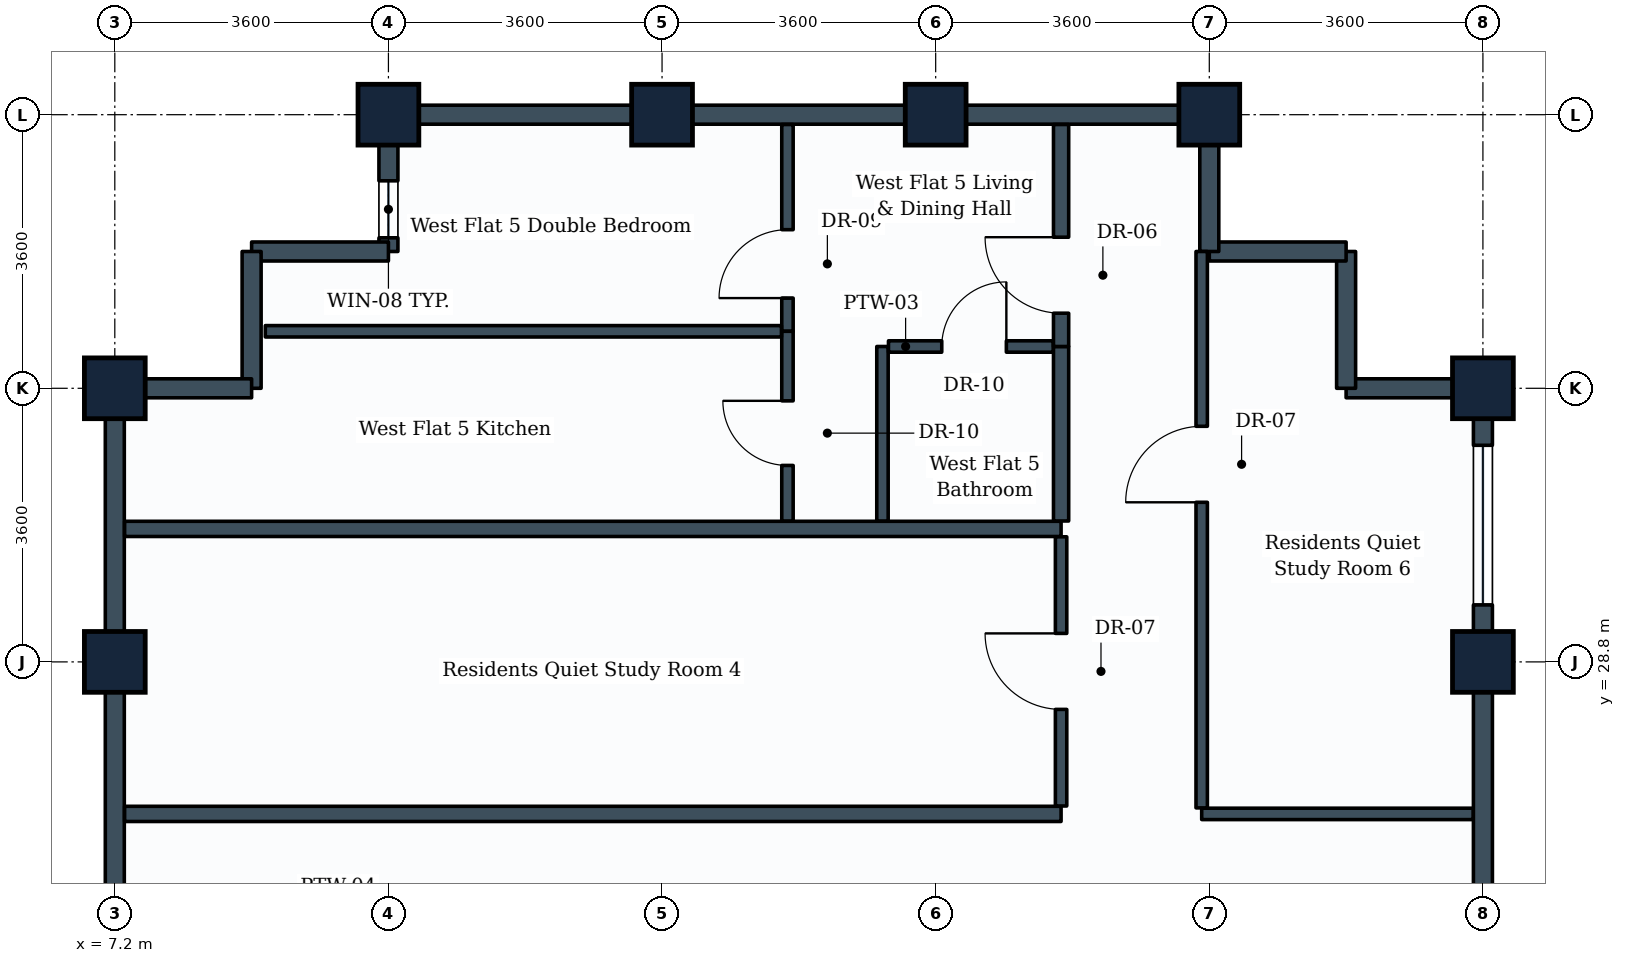
"""IFC4 building model, lengths in metres.
Left out: names, types, materials, properties, quantities, classifications, styles, units other than length and angle.
Written with IfcOpenShell. Run it as: python <this file> out.ifc"""

import sys

from ifc_helpers import new_model, si_unit, direction, frame, frame_2d, origin, origin_2d, place, context, subcontext, project, spatial, rectangle, extrude, element, fill, save


model = new_model("IFC4")
c1 = context("Model", 3, precision=1e-05, world=origin(), true_north=direction((0.0, 1.0)))
c2 = subcontext(c1, "Body", "Model", "MODEL_VIEW")
j1 = project(units=[si_unit("LENGTHUNIT", "METRE"), si_unit("PLANEANGLEUNIT", "RADIAN")], contexts=[c1])
p1 = place(None, origin())
s1 = spatial("IfcSite", under=j1, at=p1, CompositionType="ELEMENT")
p2 = place(p1, origin())
s2 = spatial("IfcBuilding", under=s1, at=p2, CompositionType="ELEMENT")
p3 = place(p2, frame((0.0, 0.0, 277.4)))
s3 = spatial("IfcBuildingStorey", under=s2, at=p3, CompositionType="ELEMENT", Elevation=277.4)
for number, where, z_axis, x_axis in (
    (1, (7.2, 28.8, 0.0), (0.0, 0.0, 1.0), (0.0, 1.0, 0.0)),
    (2, (7.2, 32.4, 0.0), (0.0, 0.0, 1.0), (0.0, 1.0, 0.0)),
    (3, (10.8, 36.0, 0.0), (0.0, 0.0, 1.0), (1.0, 0.0, 0.0)),
    (4, (14.4, 36.0, 0.0), (0.0, 0.0, 1.0), (1.0, 0.0, 0.0)),
    (5, (18.0, 36.0, 0.0), (0.0, 0.0, 1.0), (1.0, 0.0, 0.0)),
    (6, (21.6, 36.0, 0.0), (0.0, 0.0, 1.0), (1.0, 0.0, 0.0)),
    (7, (25.2, 28.8, 0.0), (0.0, 0.0, 1.0), (0.0, 1.0, 0.0)),
    (8, (25.2, 32.4, 0.0), (0.0, 0.0, 1.0), (0.0, 1.0, 0.0)),
):
    element("IfcColumn", number, at=place(p3, frame(where, z_axis=z_axis, x_axis=x_axis)), inside=s3, PredefinedType="COLUMN", context=c2, shape_type="SweptSolid", body=[
        extrude(rectangle(XDim=0.8, YDim=0.8, at=origin_2d()), origin(), (0.0, 0.0, 1.0), 3.6),
    ])
p4 = place(p3, frame((25.2, 28.8, 0.0), z_axis=(0.0, 0.0, 1.0), x_axis=(0.0, -1.0, 0.0)))
e9 = element("IfcWall", 9, at=p4, inside=s3, PredefinedType="STANDARD", context=c2, shape_type="SweptSolid", body=[
    extrude(rectangle(XDim=3.6, YDim=0.25, at=frame_2d((1.8, 0.0))), origin(), (0.0, 0.0, 1.0), 2.83),
])
p5 = place(p3, frame((25.2, 32.4, 0.0), z_axis=(0.0, 0.0, 1.0), x_axis=(0.0, -1.0, 0.0)))
e10 = element("IfcWall", 10, at=p5, inside=s3, PredefinedType="STANDARD", context=c2, shape_type="SweptSolid", body=[
    extrude(rectangle(XDim=3.6, YDim=0.25, at=frame_2d((1.8, 0.0))), origin(), (0.0, 0.0, 1.0), 2.83),
])
p6 = place(p5, frame((0.75, 0.0, 0.85)))
e11 = element("IfcOpeningElement", 11, at=p6, cuts=e10, PredefinedType="OPENING", context=c2, shape_type="SweptSolid", body=[
    extrude(rectangle(XDim=2.1, YDim=1.35, at=frame_2d((1.05, 0.675))), frame((0.0, 0.135, 0.0), z_axis=(0.0, -1.0, 0.0), x_axis=(1.0, 0.0, 0.0)), (0.0, 0.0, 1.0), 0.27),
])
p7 = place(p3, frame((23.4, 32.4, 0.0), z_axis=(0.0, 0.0, 1.0), x_axis=(1.0, 0.0, 0.0)))
e12 = element("IfcWall", 12, at=p7, inside=s3, PredefinedType="STANDARD", context=c2, shape_type="SweptSolid", body=[
    extrude(rectangle(XDim=1.8, YDim=0.25, at=frame_2d((0.9, 0.0))), origin(), (0.0, 0.0, 1.0), 2.83),
])
p8 = place(p3, frame((23.4, 32.4, 0.0), z_axis=(0.0, 0.0, 1.0), x_axis=(0.0, 1.0, 0.0)))
e13 = element("IfcWall", 13, at=p8, inside=s3, PredefinedType="STANDARD", context=c2, shape_type="SweptSolid", body=[
    extrude(rectangle(XDim=1.8, YDim=0.25, at=frame_2d((0.9, 0.0))), origin(), (0.0, 0.0, 1.0), 3.335),
])
p9 = place(p3, frame((21.6, 34.2, 0.0), z_axis=(0.0, 0.0, 1.0), x_axis=(1.0, 0.0, 0.0)))
e14 = element("IfcWall", 14, at=p9, inside=s3, PredefinedType="STANDARD", context=c2, shape_type="SweptSolid", body=[
    extrude(rectangle(XDim=1.8, YDim=0.25, at=frame_2d((0.9, 0.0))), origin(), (0.0, 0.0, 1.0), 3.335),
])
p10 = place(p3, frame((21.6, 34.2, 0.0), z_axis=(0.0, 0.0, 1.0), x_axis=(0.0, 1.0, 0.0)))
e15 = element("IfcWall", 15, at=p10, inside=s3, PredefinedType="STANDARD", context=c2, shape_type="SweptSolid", body=[
    extrude(rectangle(XDim=1.8, YDim=0.25, at=frame_2d((0.9, 0.0))), origin(), (0.0, 0.0, 1.0), 2.83),
])
for number, where, z_axis, x_axis in (
    (16, (18.0, 36.0, 0.0), (0.0, 0.0, 1.0), (1.0, 0.0, 0.0)),
    (17, (14.4, 36.0, 0.0), (0.0, 0.0, 1.0), (1.0, 0.0, 0.0)),
):
    element("IfcWall", number, at=place(p3, frame(where, z_axis=z_axis, x_axis=x_axis)), inside=s3, PredefinedType="STANDARD", context=c2, shape_type="SweptSolid", body=[
        extrude(rectangle(XDim=3.6, YDim=0.25, at=frame_2d((1.8, 0.0))), origin(), (0.0, 0.0, 1.0), 2.83),
    ])
p11 = place(p3, frame((10.8, 36.0, 0.0), z_axis=(0.0, 0.0, 1.0), x_axis=(1.0, 0.0, 0.0)))
e18 = element("IfcWall", 18, at=p11, inside=s3, PredefinedType="STANDARD", context=c2, shape_type="SweptSolid", body=[
    extrude(rectangle(XDim=3.6, YDim=0.25, at=frame_2d((1.8, 0.0))), origin(), (0.0, 0.0, 1.0), 2.83),
])
p12 = place(p3, frame((10.8, 34.2, 0.0), z_axis=(0.0, 0.0, 1.0), x_axis=(0.0, 1.0, 0.0)))
e19 = element("IfcWall", 19, at=p12, inside=s3, PredefinedType="STANDARD", context=c2, shape_type="SweptSolid", body=[
    extrude(rectangle(XDim=1.8, YDim=0.25, at=frame_2d((0.9, 0.0))), origin(), (0.0, 0.0, 1.0), 2.83),
])
p13 = place(p12, frame((0.18, 0.0, 0.85)))
e20 = element("IfcOpeningElement", 20, at=p13, cuts=e19, PredefinedType="OPENING", context=c2, shape_type="SweptSolid", body=[
    extrude(rectangle(XDim=0.75, YDim=1.05, at=frame_2d((0.375, 0.525))), frame((0.0, 0.135, 0.0), z_axis=(0.0, -1.0, 0.0), x_axis=(1.0, 0.0, 0.0)), (0.0, 0.0, 1.0), 0.27),
])
for number, where, z_axis, x_axis in (
    (21, (9.0, 34.2, 0.0), (0.0, 0.0, 1.0), (1.0, 0.0, 0.0)),
    (22, (9.0, 32.4, 0.0), (0.0, 0.0, 1.0), (0.0, 1.0, 0.0)),
):
    element("IfcWall", number, at=place(p3, frame(where, z_axis=z_axis, x_axis=x_axis)), inside=s3, PredefinedType="STANDARD", context=c2, shape_type="SweptSolid", body=[
        extrude(rectangle(XDim=1.8, YDim=0.25, at=frame_2d((0.9, 0.0))), origin(), (0.0, 0.0, 1.0), 3.335),
    ])
p14 = place(p3, frame((7.2, 32.4, 0.0), z_axis=(0.0, 0.0, 1.0), x_axis=(1.0, 0.0, 0.0)))
e23 = element("IfcWall", 23, at=p14, inside=s3, PredefinedType="STANDARD", context=c2, shape_type="SweptSolid", body=[
    extrude(rectangle(XDim=1.8, YDim=0.25, at=frame_2d((0.9, 0.0))), origin(), (0.0, 0.0, 1.0), 2.83),
])
p15 = place(p3, frame((7.2, 28.8, 0.0), z_axis=(0.0, 0.0, 1.0), x_axis=(0.0, 1.0, 0.0)))
e24 = element("IfcWall", 24, at=p15, inside=s3, PredefinedType="STANDARD", context=c2, shape_type="SweptSolid", body=[
    extrude(rectangle(XDim=3.6, YDim=0.25, at=frame_2d((1.8, 0.0))), origin(), (0.0, 0.0, 1.0), 2.83),
])
p16 = place(p3, frame((7.2, 25.2, 0.0), z_axis=(0.0, 0.0, 1.0), x_axis=(0.0, 1.0, 0.0)))
e25 = element("IfcWall", 25, at=p16, inside=s3, PredefinedType="STANDARD", context=c2, shape_type="SweptSolid", body=[
    extrude(rectangle(XDim=3.6, YDim=0.25, at=frame_2d((1.8, 0.0))), origin(), (0.0, 0.0, 1.0), 2.83),
])
for number, where, z_axis, x_axis in (
    (26, (7.329, 26.8, 0.0), (0.0, 0.0, 1.0), (1.0, 0.0, 0.0)),
    (27, (7.329, 30.55, 0.0), (0.0, 0.0, 1.0), (1.0, 0.0, 0.0)),
):
    element("IfcWall", number, at=place(p3, frame(where, z_axis=z_axis, x_axis=x_axis)), inside=s3, PredefinedType="PARTITIONING", context=c2, shape_type="SweptSolid", body=[
        extrude(rectangle(XDim=12.321, YDim=0.2, at=frame_2d((6.16, 0.0))), origin(), (0.0, 0.0, 1.0), 2.83),
    ])
p17 = place(p3, frame((19.65, 26.904, 0.0), z_axis=(0.0, 0.0, 1.0), x_axis=(0.0, 1.0, 0.0)))
e28 = element("IfcWall", 28, at=p17, inside=s3, PredefinedType="PARTITIONING", context=c2, shape_type="SweptSolid", body=[
    extrude(rectangle(XDim=3.542, YDim=0.15, at=frame_2d((1.771, 0.0))), origin(), (0.0, 0.0, 1.0), 3.03),
])
p18 = place(p17, frame((1.271, 0.0, 0.0)))
e29 = element("IfcOpeningElement", 29, at=p18, cuts=e28, PredefinedType="OPENING", context=c2, shape_type="SweptSolid", body=[
    extrude(rectangle(XDim=1.0, YDim=2.1, at=frame_2d((0.5, 1.05))), frame((0.0, 0.085, 0.0), z_axis=(0.0, -1.0, 0.0), x_axis=(1.0, 0.0, 0.0)), (0.0, 0.0, 1.0), 0.17),
])
p19 = place(p3, frame((19.65, 30.654, 0.0), z_axis=(0.0, 0.0, 1.0), x_axis=(0.0, 1.0, 0.0)))
e30 = element("IfcWall", 30, at=p19, inside=s3, PredefinedType="PARTITIONING", context=c2, shape_type="SweptSolid", body=[
    extrude(rectangle(XDim=2.296, YDim=0.2, at=frame_2d((1.148, 0.0))), origin(), (0.0, 0.0, 1.0), 3.335),
])
p20 = place(p3, frame((17.3, 30.654, 0.0), z_axis=(0.0, 0.0, 1.0), x_axis=(0.0, 1.0, 0.0)))
e31 = element("IfcWall", 31, at=p20, inside=s3, PredefinedType="PARTITIONING", context=c2, shape_type="SweptSolid", body=[
    extrude(rectangle(XDim=2.296, YDim=0.15, at=frame_2d((1.148, 0.0))), origin(), (0.0, 0.0, 1.0), 3.335),
])
p21 = place(p3, frame((17.379, 32.95, 0.0), z_axis=(0.0, 0.0, 1.0), x_axis=(1.0, 0.0, 0.0)))
e32 = element("IfcWall", 32, at=p21, inside=s3, PredefinedType="PARTITIONING", context=c2, shape_type="SweptSolid", body=[
    extrude(rectangle(XDim=2.167, YDim=0.15, at=frame_2d((1.083, 0.0))), origin(), (0.0, 0.0, 1.0), 3.03),
])
p22 = place(p21, frame((0.701, 0.0, 0.0)))
e33 = element("IfcOpeningElement", 33, at=p22, cuts=e32, PredefinedType="OPENING", context=c2, shape_type="SweptSolid", body=[
    extrude(rectangle(XDim=0.85, YDim=2.1, at=frame_2d((0.425, 1.05))), frame((0.0, 0.085, 0.0), z_axis=(0.0, -1.0, 0.0), x_axis=(1.0, 0.0, 0.0)), (0.0, 0.0, 1.0), 0.17),
])
p23 = place(p3, frame((19.65, 32.95, 0.0), z_axis=(0.0, 0.0, 1.0), x_axis=(0.0, 1.0, 0.0)))
e34 = element("IfcWall", 34, at=p23, inside=s3, PredefinedType="PARTITIONING", context=c2, shape_type="SweptSolid", body=[
    extrude(rectangle(XDim=2.921, YDim=0.2, at=frame_2d((1.46, 0.0))), origin(), (0.0, 0.0, 1.0), 2.83),
])
p24 = place(p23, frame((0.438, 0.0, 0.0)))
e35 = element("IfcOpeningElement", 35, at=p24, cuts=e34, PredefinedType="OPENING", context=c2, shape_type="SweptSolid", body=[
    extrude(rectangle(XDim=1.0, YDim=2.1, at=frame_2d((0.5, 1.05))), frame((0.0, 0.11, 0.0), z_axis=(0.0, -1.0, 0.0), x_axis=(1.0, 0.0, 0.0)), (0.0, 0.0, 1.0), 0.22),
])
p25 = place(p3, frame((16.05, 33.15, 0.0), z_axis=(0.0, 0.0, 1.0), x_axis=(0.0, 1.0, 0.0)))
e36 = element("IfcWall", 36, at=p25, inside=s3, PredefinedType="PARTITIONING", context=c2, shape_type="SweptSolid", body=[
    extrude(rectangle(XDim=2.721, YDim=0.15, at=frame_2d((1.361, 0.0))), origin(), (0.0, 0.0, 1.0), 2.83),
])
p26 = place(p25, frame((0.437, 0.0, 0.0)))
e37 = element("IfcOpeningElement", 37, at=p26, cuts=e36, PredefinedType="OPENING", context=c2, shape_type="SweptSolid", body=[
    extrude(rectangle(XDim=0.9, YDim=2.1, at=frame_2d((0.45, 1.05))), frame((0.0, 0.085, 0.0), z_axis=(0.0, -1.0, 0.0), x_axis=(1.0, 0.0, 0.0)), (0.0, 0.0, 1.0), 0.17),
])
p27 = place(p3, frame((16.05, 30.654, 0.0), z_axis=(0.0, 0.0, 1.0), x_axis=(0.0, 1.0, 0.0)))
e38 = element("IfcWall", 38, at=p27, inside=s3, PredefinedType="PARTITIONING", context=c2, shape_type="SweptSolid", body=[
    extrude(rectangle(XDim=2.496, YDim=0.15, at=frame_2d((1.248, 0.0))), origin(), (0.0, 0.0, 1.0), 3.335),
])
p28 = place(p27, frame((0.731, 0.0, 0.0)))
e39 = element("IfcOpeningElement", 39, at=p28, cuts=e38, PredefinedType="OPENING", context=c2, shape_type="SweptSolid", body=[
    extrude(rectangle(XDim=0.85, YDim=2.1, at=frame_2d((0.425, 1.05))), frame((0.0, 0.085, 0.0), z_axis=(0.0, -1.0, 0.0), x_axis=(1.0, 0.0, 0.0)), (0.0, 0.0, 1.0), 0.17),
])
p29 = place(p3, frame((9.18, 33.15, 0.0), z_axis=(0.0, 0.0, 1.0), x_axis=(1.0, 0.0, 0.0)))
e40 = element("IfcWall", 40, at=p29, inside=s3, PredefinedType="PARTITIONING", context=c2, shape_type="SweptSolid", body=[
    extrude(rectangle(XDim=6.791, YDim=0.15, at=frame_2d((3.396, 0.0))), origin(), (0.0, 0.0, 1.0), 3.335),
])
p30 = place(p3, frame((21.5, 26.8, 0.0), z_axis=(0.0, 0.0, 1.0), x_axis=(1.0, 0.0, 0.0)))
e41 = element("IfcWall", 41, at=p30, inside=s3, PredefinedType="PARTITIONING", context=c2, shape_type="SweptSolid", body=[
    extrude(rectangle(XDim=3.571, YDim=0.15, at=frame_2d((1.786, 0.0))), origin(), (0.0, 0.0, 1.0), 2.83),
])
p31 = place(p3, frame((21.5, 26.879, 0.0), z_axis=(0.0, 0.0, 1.0), x_axis=(0.0, 1.0, 0.0)))
e42 = element("IfcWall", 42, at=p31, inside=s3, PredefinedType="PARTITIONING", context=c2, shape_type="SweptSolid", body=[
    extrude(rectangle(XDim=7.321, YDim=0.15, at=frame_2d((3.661, 0.0))), origin(), (0.0, 0.0, 1.0), 3.03),
])
p32 = place(p31, frame((4.021, 0.0, 0.0)))
e43 = element("IfcOpeningElement", 43, at=p32, cuts=e42, PredefinedType="OPENING", context=c2, shape_type="SweptSolid", body=[
    extrude(rectangle(XDim=1.0, YDim=2.1, at=frame_2d((0.5, 1.05))), frame((0.0, 0.085, 0.0), z_axis=(0.0, -1.0, 0.0), x_axis=(1.0, 0.0, 0.0)), (0.0, 0.0, 1.0), 0.17),
])
p33 = place(p6, origin())
e44 = element("IfcWindow", 44, at=p33, inside=s3, PartitioningType="SINGLE_PANEL", PredefinedType="WINDOW", context=c2, shape_type="SweptSolid", body=[
    extrude(rectangle(XDim=2.1, YDim=1.35, at=frame_2d((1.05, 0.675))), frame((0.0, 0.03, 0.0), z_axis=(0.0, -1.0, 0.0), x_axis=(1.0, 0.0, 0.0)), (0.0, 0.0, 1.0), 0.06),
])
fill(e11, e44)
p34 = place(p18, origin())
e45 = element("IfcDoor", 45, at=p34, inside=s3, OperationType="SINGLE_SWING_RIGHT", PredefinedType="DOOR", context=c2, shape_type="SweptSolid", body=[
    extrude(rectangle(XDim=1.0, YDim=2.1, at=frame_2d((0.5, 1.05))), frame((0.0, 0.025, 0.0), z_axis=(0.0, -1.0, 0.0), x_axis=(1.0, 0.0, 0.0)), (0.0, 0.0, 1.0), 0.05),
])
fill(e29, e45)
p35 = place(p22, origin())
e46 = element("IfcDoor", 46, at=p35, inside=s3, OperationType="SINGLE_SWING_RIGHT", PredefinedType="DOOR", context=c2, shape_type="SweptSolid", body=[
    extrude(rectangle(XDim=0.85, YDim=2.1, at=frame_2d((0.425, 1.05))), frame((0.0, 0.025, 0.0), z_axis=(0.0, -1.0, 0.0), x_axis=(1.0, 0.0, 0.0)), (0.0, 0.0, 1.0), 0.05),
])
fill(e33, e46)
p36 = place(p24, origin())
e47 = element("IfcDoor", 47, at=p36, inside=s3, OperationType="SINGLE_SWING_RIGHT", PredefinedType="DOOR", context=c2, shape_type="SweptSolid", body=[
    extrude(rectangle(XDim=1.0, YDim=2.1, at=frame_2d((0.5, 1.05))), frame((0.0, 0.025, 0.0), z_axis=(0.0, -1.0, 0.0), x_axis=(1.0, 0.0, 0.0)), (0.0, 0.0, 1.0), 0.05),
])
fill(e35, e47)
p37 = place(p26, origin())
e48 = element("IfcDoor", 48, at=p37, inside=s3, OperationType="SINGLE_SWING_LEFT", PredefinedType="DOOR", context=c2, shape_type="SweptSolid", body=[
    extrude(rectangle(XDim=0.9, YDim=2.1, at=frame_2d((0.45, 1.05))), frame((0.0, 0.025, 0.0), z_axis=(0.0, -1.0, 0.0), x_axis=(1.0, 0.0, 0.0)), (0.0, 0.0, 1.0), 0.05),
])
fill(e37, e48)
p38 = place(p28, origin())
e49 = element("IfcDoor", 49, at=p38, inside=s3, OperationType="SINGLE_SWING_RIGHT", PredefinedType="DOOR", context=c2, shape_type="SweptSolid", body=[
    extrude(rectangle(XDim=0.85, YDim=2.1, at=frame_2d((0.425, 1.05))), frame((0.0, 0.025, 0.0), z_axis=(0.0, -1.0, 0.0), x_axis=(1.0, 0.0, 0.0)), (0.0, 0.0, 1.0), 0.05),
])
fill(e39, e49)
p39 = place(p32, origin())
e50 = element("IfcDoor", 50, at=p39, inside=s3, OperationType="SINGLE_SWING_LEFT", PredefinedType="DOOR", context=c2, shape_type="SweptSolid", body=[
    extrude(rectangle(XDim=1.0, YDim=2.1, at=frame_2d((0.5, 1.05))), frame((0.0, 0.025, 0.0), z_axis=(0.0, -1.0, 0.0), x_axis=(1.0, 0.0, 0.0)), (0.0, 0.0, 1.0), 0.05),
])
fill(e43, e50)
p40 = place(p13, origin())
e51 = element("IfcWindow", 51, at=p40, inside=s3, PartitioningType="SINGLE_PANEL", PredefinedType="WINDOW", context=c2, shape_type="SweptSolid", body=[
    extrude(rectangle(XDim=0.75, YDim=1.05, at=frame_2d((0.375, 0.525))), frame((0.0, 0.03, 0.0), z_axis=(0.0, -1.0, 0.0), x_axis=(1.0, 0.0, 0.0)), (0.0, 0.0, 1.0), 0.06),
])
fill(e20, e51)
save(model, sys.argv[1])
